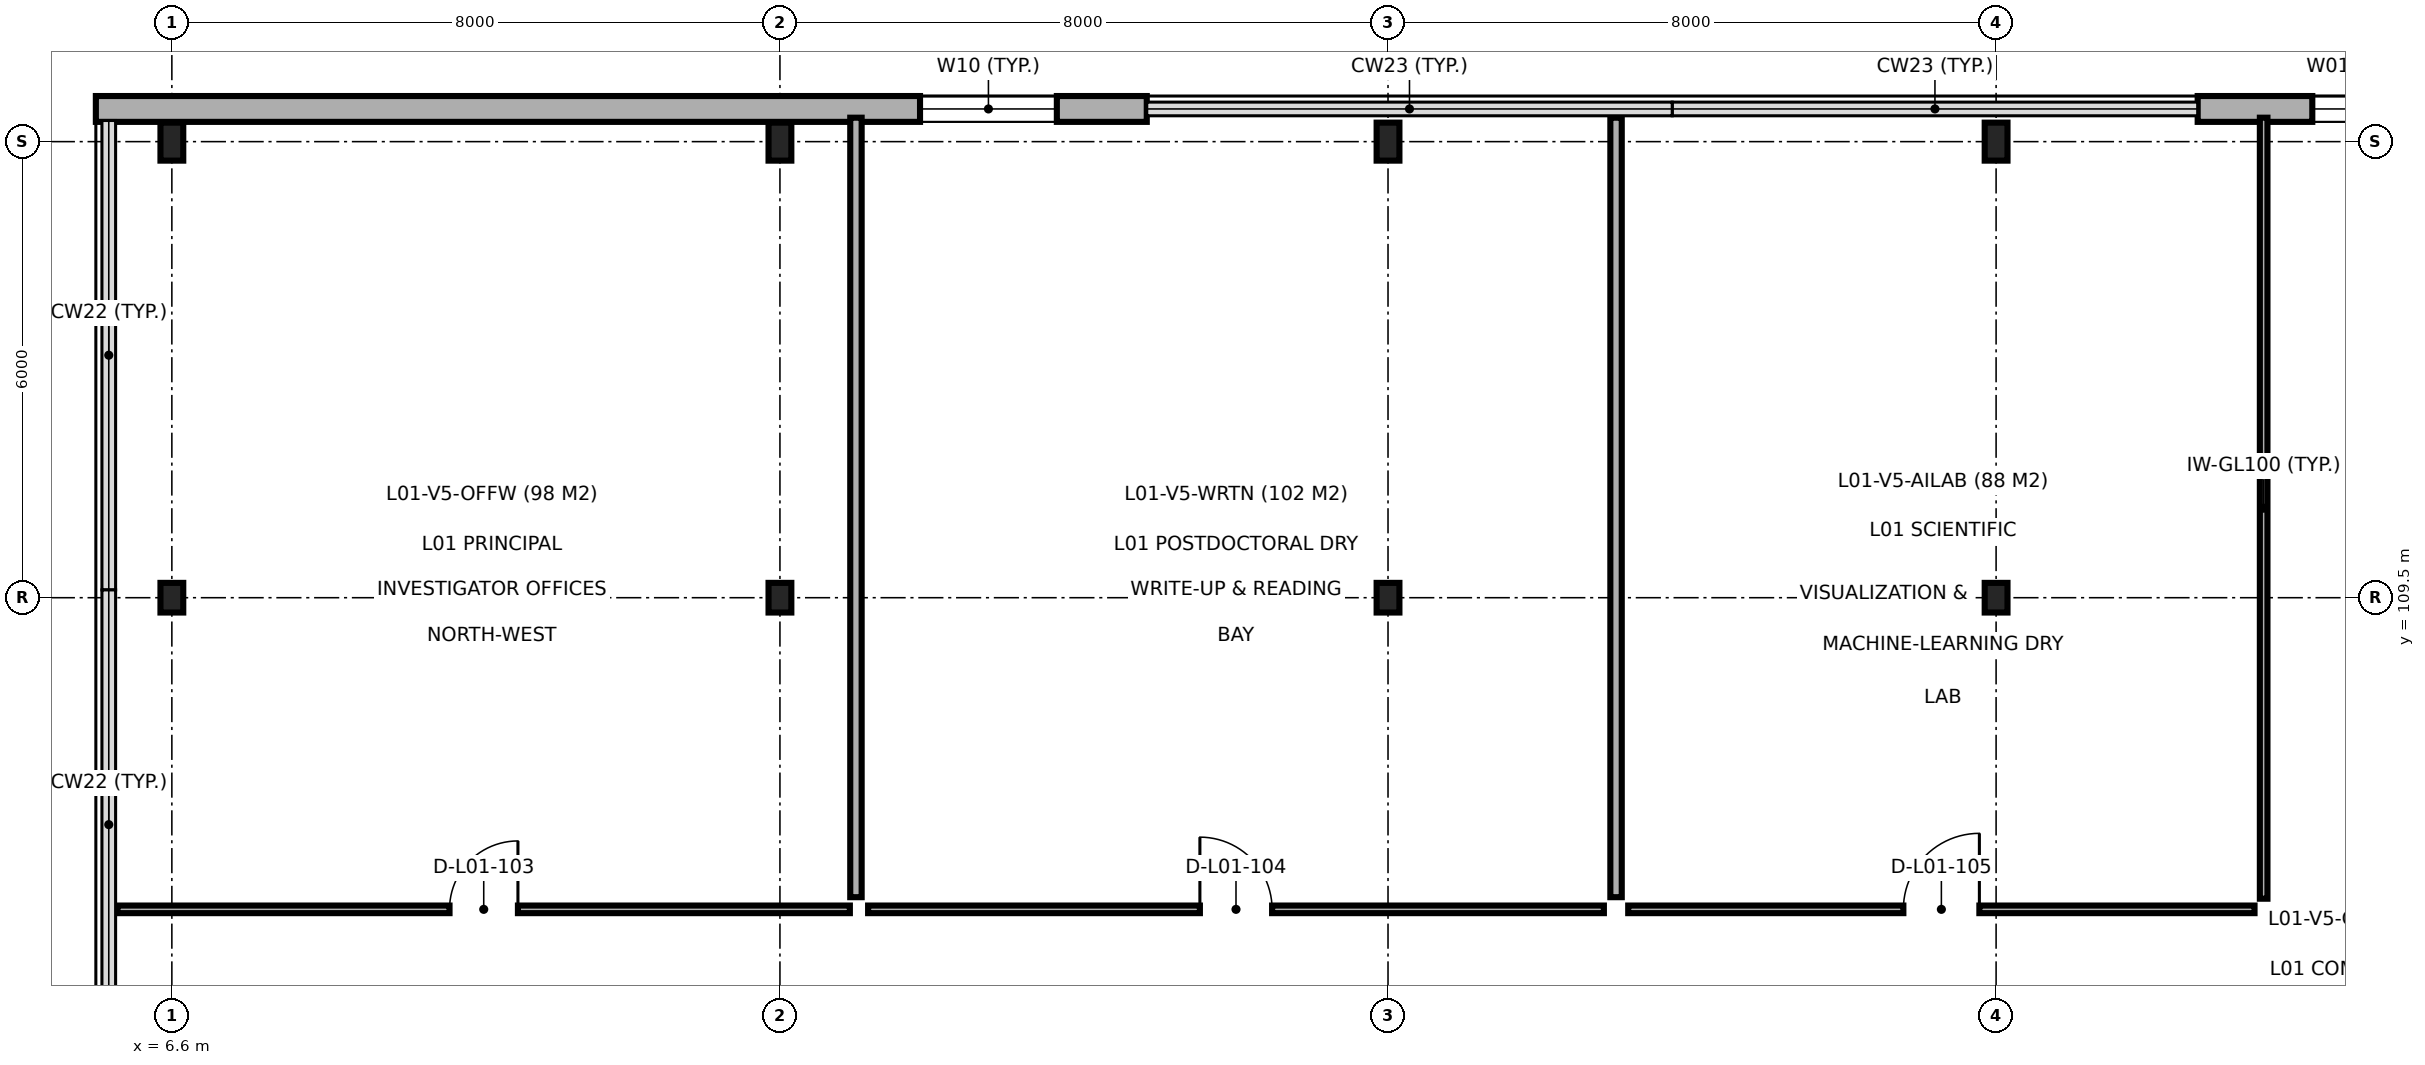
"""IFC4 building model, lengths in metres.
Left out: names, types, materials, properties, quantities, classifications, styles, units other than length and angle.
Written with IfcOpenShell. Run it as: python <this file> out.ifc"""

import sys

from ifc_helpers import new_model, si_unit, direction, frame, frame_2d, origin, origin_2d, place, context, subcontext, project, spatial, rectangle, i_section, extrude, element, fill, save


model = new_model("IFC4")
c1 = context("Model", 3, precision=1e-05, world=origin(), true_north=direction((0.0, 1.0)))
c2 = subcontext(c1, "Body", "Model", "MODEL_VIEW")
j1 = project(units=[si_unit("LENGTHUNIT", "METRE"), si_unit("PLANEANGLEUNIT", "RADIAN")], contexts=[c1])
p1 = place(None, origin())
s1 = spatial("IfcSite", under=j1, at=p1, CompositionType="ELEMENT")
p2 = place(p1, origin())
s2 = spatial("IfcBuilding", under=s1, at=p2, CompositionType="ELEMENT")
p3 = place(p2, frame((0.0, 0.0, 4.8)))
s3 = spatial("IfcBuildingStorey", under=s2, at=p3, CompositionType="ELEMENT", Elevation=4.8)
p4 = place(p3, frame((6.6, 109.5, 0.0), z_axis=(0.0, 0.0, 1.0), x_axis=(1.0, 0.0, 0.0)))
e1 = element("IfcColumn", 1, at=p4, inside=s3, PredefinedType="COLUMN", context=c2, shape_type="SweptSolid", body=[
    extrude(i_section(OverallWidth=0.3, OverallDepth=0.39, WebThickness=0.011, FlangeThickness=0.019, FilletRadius=0.027, at=origin_2d()), origin(), (0.0, 0.0, 1.0), 4.5),
])
p5 = place(p3, frame((6.6, 115.5, 0.0), z_axis=(0.0, 0.0, 1.0), x_axis=(1.0, 0.0, 0.0)))
e2 = element("IfcColumn", 2, at=p5, inside=s3, PredefinedType="COLUMN", context=c2, shape_type="SweptSolid", body=[
    extrude(i_section(OverallWidth=0.3, OverallDepth=0.5, WebThickness=0.014, FlangeThickness=0.028, FilletRadius=0.027, at=origin_2d()), origin(), (0.0, 0.0, 1.0), 4.5),
])
p6 = place(p3, frame((14.6, 109.5, 0.0), z_axis=(0.0, 0.0, 1.0), x_axis=(1.0, 0.0, 0.0)))
e3 = element("IfcColumn", 3, at=p6, inside=s3, PredefinedType="COLUMN", context=c2, shape_type="SweptSolid", body=[
    extrude(i_section(OverallWidth=0.3, OverallDepth=0.39, WebThickness=0.011, FlangeThickness=0.019, FilletRadius=0.027, at=origin_2d()), origin(), (0.0, 0.0, 1.0), 4.5),
])
p7 = place(p3, frame((14.6, 115.5, 0.0), z_axis=(0.0, 0.0, 1.0), x_axis=(1.0, 0.0, 0.0)))
e4 = element("IfcColumn", 4, at=p7, inside=s3, PredefinedType="COLUMN", context=c2, shape_type="SweptSolid", body=[
    extrude(i_section(OverallWidth=0.3, OverallDepth=0.5, WebThickness=0.014, FlangeThickness=0.028, FilletRadius=0.027, at=origin_2d()), origin(), (0.0, 0.0, 1.0), 4.5),
])
p8 = place(p3, frame((22.6, 109.5, 0.0), z_axis=(0.0, 0.0, 1.0), x_axis=(1.0, 0.0, 0.0)))
e5 = element("IfcColumn", 5, at=p8, inside=s3, PredefinedType="COLUMN", context=c2, shape_type="SweptSolid", body=[
    extrude(i_section(OverallWidth=0.3, OverallDepth=0.39, WebThickness=0.011, FlangeThickness=0.019, FilletRadius=0.027, at=origin_2d()), origin(), (0.0, 0.0, 1.0), 4.5),
])
p9 = place(p3, frame((22.6, 115.5, 0.0), z_axis=(0.0, 0.0, 1.0), x_axis=(1.0, 0.0, 0.0)))
e6 = element("IfcColumn", 6, at=p9, inside=s3, PredefinedType="COLUMN", context=c2, shape_type="SweptSolid", body=[
    extrude(i_section(OverallWidth=0.3, OverallDepth=0.5, WebThickness=0.014, FlangeThickness=0.028, FilletRadius=0.027, at=origin_2d()), origin(), (0.0, 0.0, 1.0), 4.5),
])
p10 = place(p3, frame((30.6, 109.5, 0.0), z_axis=(0.0, 0.0, 1.0), x_axis=(1.0, 0.0, 0.0)))
e7 = element("IfcColumn", 7, at=p10, inside=s3, PredefinedType="COLUMN", context=c2, shape_type="SweptSolid", body=[
    extrude(i_section(OverallWidth=0.3, OverallDepth=0.39, WebThickness=0.011, FlangeThickness=0.019, FilletRadius=0.027, at=origin_2d()), origin(), (0.0, 0.0, 1.0), 4.5),
])
p11 = place(p3, frame((30.6, 115.5, 0.0), z_axis=(0.0, 0.0, 1.0), x_axis=(1.0, 0.0, 0.0)))
e8 = element("IfcColumn", 8, at=p11, inside=s3, PredefinedType="COLUMN", context=c2, shape_type="SweptSolid", body=[
    extrude(i_section(OverallWidth=0.3, OverallDepth=0.5, WebThickness=0.014, FlangeThickness=0.028, FilletRadius=0.027, at=origin_2d()), origin(), (0.0, 0.0, 1.0), 4.5),
])
p12 = place(p3, frame((47.078, 115.93, 0.0), z_axis=(0.0, 0.0, 1.0), x_axis=(-1.0, 0.0, 0.0)))
e9 = element("IfcWall", 9, at=p12, inside=s3, PredefinedType="SOLIDWALL", context=c2, shape_type="SweptSolid", body=[
    extrude(rectangle(XDim=13.826, YDim=0.34, at=frame_2d((6.913, 0.0))), origin(), (0.0, 0.0, 1.0), 4.25),
])
p13 = place(p12, frame((9.158, 0.0, 0.9)))
e10 = element("IfcOpeningElement", 10, at=p13, cuts=e9, PredefinedType="OPENING", context=c2, shape_type="SweptSolid", body=[
    extrude(rectangle(XDim=0.9, YDim=1.8, at=frame_2d((0.45, 0.9))), frame((0.0, 0.18, 0.0), z_axis=(0.0, -1.0, 0.0), x_axis=(1.0, 0.0, 0.0)), (0.0, 0.0, 1.0), 0.36),
])
p14 = place(p12, frame((11.118, 0.0, 0.9)))
e11 = element("IfcOpeningElement", 11, at=p14, cuts=e9, PredefinedType="OPENING", context=c2, shape_type="SweptSolid", body=[
    extrude(rectangle(XDim=1.2, YDim=1.8, at=frame_2d((0.6, 0.9))), frame((0.0, 0.18, 0.0), z_axis=(0.0, -1.0, 0.0), x_axis=(1.0, 0.0, 0.0)), (0.0, 0.0, 1.0), 0.36),
])
p15 = place(p3, frame((19.426, 115.93, 0.0), z_axis=(0.0, 0.0, 1.0), x_axis=(-1.0, 0.0, 0.0)))
e12 = element("IfcWall", 12, at=p15, inside=s3, PredefinedType="SOLIDWALL", context=c2, shape_type="SweptSolid", body=[
    extrude(rectangle(XDim=13.826, YDim=0.34, at=frame_2d((6.913, 0.0))), origin(), (0.0, 0.0, 1.0), 4.25),
])
p16 = place(p15, frame((1.183, 0.0, 0.9)))
e13 = element("IfcOpeningElement", 13, at=p16, cuts=e12, PredefinedType="OPENING", context=c2, shape_type="SweptSolid", body=[
    extrude(rectangle(XDim=1.8, YDim=2.1, at=frame_2d((0.9, 1.05))), frame((0.0, 0.18, 0.0), z_axis=(0.0, -1.0, 0.0), x_axis=(1.0, 0.0, 0.0)), (0.0, 0.0, 1.0), 0.36),
])
p17 = place(p3, frame((15.6, 105.56, 0.0), z_axis=(0.0, 0.0, 1.0), x_axis=(0.0, 1.0, 0.0)))
e14 = element("IfcWall", 14, at=p17, inside=s3, PredefinedType="PARTITIONING", context=c2, shape_type="SweptSolid", body=[
    extrude(rectangle(XDim=10.255, YDim=0.15, at=frame_2d((5.127, 0.0))), origin(), (0.0, 0.0, 1.0), 4.25),
])
p18 = place(p3, frame((25.6, 105.56, 0.0), z_axis=(0.0, 0.0, 1.0), x_axis=(0.0, 1.0, 0.0)))
e15 = element("IfcWall", 15, at=p18, inside=s3, PredefinedType="PARTITIONING", context=c2, shape_type="SweptSolid", body=[
    extrude(rectangle(XDim=10.255, YDim=0.15, at=frame_2d((5.127, 0.0))), origin(), (0.0, 0.0, 1.0), 3.95),
])
p19 = place(p3, frame((34.12, 105.54, 0.0), z_axis=(0.0, 0.0, 1.0), x_axis=(0.0, 1.0, 0.0)))
e16 = element("IfcWall", 16, at=p19, inside=s3, PredefinedType="PARTITIONING", context=c2, shape_type="SweptSolid", body=[
    extrude(rectangle(XDim=10.275, YDim=0.1, at=frame_2d((5.137, 0.0))), origin(), (0.0, 0.0, 1.0), 4.25),
])
p20 = place(p3, frame((5.885, 105.4, 0.0), z_axis=(0.0, 0.0, 1.0), x_axis=(1.0, 0.0, 0.0)))
e17 = element("IfcWall", 17, at=p20, inside=s3, PredefinedType="PARTITIONING", context=c2, shape_type="SweptSolid", body=[
    extrude(rectangle(XDim=9.635, YDim=0.1, at=frame_2d((4.817, 0.0))), origin(), (0.0, 0.0, 1.0), 4.25),
])
p21 = place(p20, frame((4.368, 0.0, 0.0)))
e18 = element("IfcOpeningElement", 18, at=p21, cuts=e17, PredefinedType="OPENING", context=c2, shape_type="SweptSolid", body=[
    extrude(rectangle(XDim=0.9, YDim=2.1, at=frame_2d((0.45, 1.05))), frame((0.0, 0.06, 0.0), z_axis=(0.0, -1.0, 0.0), x_axis=(1.0, 0.0, 0.0)), (0.0, 0.0, 1.0), 0.12),
])
p22 = place(p3, frame((15.76, 105.4, 0.0), z_axis=(0.0, 0.0, 1.0), x_axis=(1.0, 0.0, 0.0)))
e19 = element("IfcWall", 19, at=p22, inside=s3, PredefinedType="PARTITIONING", context=c2, shape_type="SweptSolid", body=[
    extrude(rectangle(XDim=9.68, YDim=0.1, at=frame_2d((4.84, 0.0))), origin(), (0.0, 0.0, 1.0), 4.25),
])
p23 = place(p22, frame((4.365, 0.0, 0.0)))
e20 = element("IfcOpeningElement", 20, at=p23, cuts=e19, PredefinedType="OPENING", context=c2, shape_type="SweptSolid", body=[
    extrude(rectangle(XDim=0.95, YDim=2.1, at=frame_2d((0.475, 1.05))), frame((0.0, 0.06, 0.0), z_axis=(0.0, -1.0, 0.0), x_axis=(1.0, 0.0, 0.0)), (0.0, 0.0, 1.0), 0.12),
])
p24 = place(p3, frame((25.76, 105.4, 0.0), z_axis=(0.0, 0.0, 1.0), x_axis=(1.0, 0.0, 0.0)))
e21 = element("IfcWall", 21, at=p24, inside=s3, PredefinedType="PARTITIONING", context=c2, shape_type="SweptSolid", body=[
    extrude(rectangle(XDim=8.24, YDim=0.1, at=frame_2d((4.12, 0.0))), origin(), (0.0, 0.0, 1.0), 4.25),
])
p25 = place(p24, frame((3.62, 0.0, 0.0)))
e22 = element("IfcOpeningElement", 22, at=p25, cuts=e21, PredefinedType="OPENING", context=c2, shape_type="SweptSolid", body=[
    extrude(rectangle(XDim=1.0, YDim=2.15, at=frame_2d((0.5, 1.075))), frame((0.0, 0.06, 0.0), z_axis=(0.0, -1.0, 0.0), x_axis=(1.0, 0.0, 0.0)), (0.0, 0.0, 1.0), 0.12),
])
p26 = place(p14, origin())
e23 = element("IfcWindow", 23, at=p26, inside=s3, PartitioningType="SINGLE_PANEL", PredefinedType="WINDOW", context=c2, shape_type="SweptSolid", body=[
    extrude(rectangle(XDim=1.2, YDim=1.8, at=frame_2d((0.6, 0.9))), frame((0.0, 0.03, 0.0), z_axis=(0.0, -1.0, 0.0), x_axis=(1.0, 0.0, 0.0)), (0.0, 0.0, 1.0), 0.06),
])
fill(e11, e23)
p27 = place(p16, origin())
e24 = element("IfcWindow", 24, at=p27, inside=s3, PartitioningType="SINGLE_PANEL", PredefinedType="WINDOW", context=c2, shape_type="SweptSolid", body=[
    extrude(rectangle(XDim=1.8, YDim=2.1, at=frame_2d((0.9, 1.05))), frame((0.0, 0.03, 0.0), z_axis=(0.0, -1.0, 0.0), x_axis=(1.0, 0.0, 0.0)), (0.0, 0.0, 1.0), 0.06),
])
fill(e13, e24)
p28 = place(p21, origin())
e25 = element("IfcDoor", 25, at=p28, inside=s3, OperationType="SINGLE_SWING_RIGHT", PredefinedType="DOOR", context=c2, shape_type="SweptSolid", body=[
    extrude(rectangle(XDim=0.9, YDim=2.1, at=frame_2d((0.45, 1.05))), frame((0.0, 0.025, 0.0), z_axis=(0.0, -1.0, 0.0), x_axis=(1.0, 0.0, 0.0)), (0.0, 0.0, 1.0), 0.05),
])
fill(e18, e25)
p29 = place(p23, origin())
e26 = element("IfcDoor", 26, at=p29, inside=s3, OperationType="SINGLE_SWING_LEFT", PredefinedType="DOOR", context=c2, shape_type="SweptSolid", body=[
    extrude(rectangle(XDim=0.95, YDim=2.1, at=frame_2d((0.475, 1.05))), frame((0.0, 0.025, 0.0), z_axis=(0.0, -1.0, 0.0), x_axis=(1.0, 0.0, 0.0)), (0.0, 0.0, 1.0), 0.05),
])
fill(e20, e26)
p30 = place(p25, origin())
e27 = element("IfcDoor", 27, at=p30, inside=s3, OperationType="SINGLE_SWING_RIGHT", PredefinedType="DOOR", context=c2, shape_type="SweptSolid", body=[
    extrude(rectangle(XDim=1.0, YDim=2.15, at=frame_2d((0.5, 1.075))), frame((0.0, 0.025, 0.0), z_axis=(0.0, -1.0, 0.0), x_axis=(1.0, 0.0, 0.0)), (0.0, 0.0, 1.0), 0.05),
])
fill(e22, e27)
save(model, sys.argv[1])
